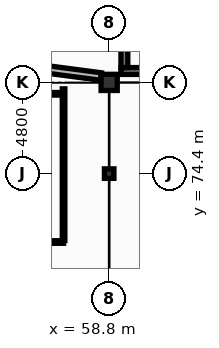
"""IFC4 building model, lengths in metres.
Left out: names, types, materials, properties, quantities, classifications, styles, units other than length and angle.
Written with IfcOpenShell. Run it as: python <this file> out.ifc"""

import sys

from ifc_helpers import new_model, si_unit, direction, frame, frame_2d, origin, origin_2d, place, context, subcontext, project, spatial, rectangle, extrude, element, save


model = new_model("IFC4")
c1 = context("Model", 3, precision=1e-05, world=origin(), true_north=direction((0.0, 1.0)))
c2 = subcontext(c1, "Body", "Model", "MODEL_VIEW")
j1 = project(units=[si_unit("LENGTHUNIT", "METRE"), si_unit("PLANEANGLEUNIT", "RADIAN")], contexts=[c1])
p1 = place(None, origin())
s1 = spatial("IfcSite", under=j1, at=p1, CompositionType="ELEMENT")
p2 = place(p1, origin())
s2 = spatial("IfcBuilding", under=s1, at=p2, CompositionType="ELEMENT")
p3 = place(p2, frame((0.0, 0.0, 5.4)))
s3 = spatial("IfcBuildingStorey", under=s2, at=p3, CompositionType="ELEMENT", Elevation=5.4)
p4 = place(p3, frame((58.8, 79.2, 0.0), z_axis=(0.0, 0.0, 1.0), x_axis=(1.0, 0.0, 0.0)))
e1 = element("IfcColumn", 1, at=p4, inside=s3, PredefinedType="COLUMN", context=c2, shape_type="SweptSolid", body=[
    extrude(rectangle(XDim=0.85, YDim=0.85, at=origin_2d()), origin(), (0.0, 0.0, 1.0), 4.5),
])
p5 = place(p3, frame((58.8, 74.4, 0.0), z_axis=(0.0, 0.0, 1.0), x_axis=(1.0, 0.0, 0.0)))
e2 = element("IfcColumn", 2, at=p5, inside=s3, PredefinedType="COLUMN", context=c2, shape_type="SweptSolid", body=[
    extrude(rectangle(XDim=0.5, YDim=0.5, at=origin_2d()), origin(), (0.0, 0.0, 1.0), 4.5),
])
p6 = place(p3, frame((55.572, 79.877, 0.0), z_axis=(0.0, 0.0, 1.0), x_axis=(0.991443994311, -0.130532778046, 0.0)))
e3 = element("IfcWall", 3, at=p6, inside=s3, PredefinedType="ELEMENTEDWALL", context=c2, shape_type="SweptSolid", body=[
    extrude(rectangle(XDim=2.824, YDim=0.395, at=frame_2d((1.412, 0.0))), origin(), (0.0, 0.0, 1.0), 3.37),
])
p7 = place(p3, frame((68.78, 79.8, 0.0), z_axis=(0.0, 0.0, 1.0), x_axis=(-1.0, 0.0, 0.0)))
e4 = element("IfcWall", 4, at=p7, inside=s3, PredefinedType="SHEAR", context=c2, shape_type="SweptSolid", body=[
    extrude(rectangle(XDim=9.36, YDim=0.36, at=frame_2d((4.68, 0.0))), origin(), (0.0, 0.0, 1.0), 4.24),
])
p8 = place(p3, frame((59.6, 79.98, 0.0), z_axis=(0.0, 0.0, 1.0), x_axis=(0.0, 1.0, 0.0)))
e5 = element("IfcWall", 5, at=p8, inside=s3, PredefinedType="SHEAR", context=c2, shape_type="SweptSolid", body=[
    extrude(rectangle(XDim=3.36, YDim=0.36, at=frame_2d((1.68, 0.0))), origin(), (0.0, 0.0, 1.0), 4.24),
])
p9 = place(p8, frame((1.08, 0.0, 0.0)))
e6 = element("IfcOpeningElement", 6, at=p9, cuts=e5, PredefinedType="OPENING", context=c2, shape_type="SweptSolid", body=[
    extrude(rectangle(XDim=1.2, YDim=2.2, at=frame_2d((0.6, 1.1))), frame((0.0, 0.19, 0.0), z_axis=(0.0, -1.0, 0.0), x_axis=(1.0, 0.0, 0.0)), (0.0, 0.0, 1.0), 0.38),
])
p10 = place(p3, frame((46.8, 78.6, 0.0), z_axis=(0.0, 0.0, 1.0), x_axis=(1.0, 0.0, 0.0)))
e7 = element("IfcWall", 7, at=p10, inside=s3, PredefinedType="PARTITIONING", context=c2, shape_type="SweptSolid", body=[
    extrude(rectangle(XDim=9.6, YDim=0.135, at=frame_2d((4.8, 0.0))), origin(), (0.0, 0.0, 1.0), 4.225),
])
p11 = place(p3, frame((56.4, 70.8, 0.0), z_axis=(0.0, 0.0, 1.0), x_axis=(-1.0, 0.0, 0.0)))
e8 = element("IfcWall", 8, at=p11, inside=s3, PredefinedType="PARTITIONING", context=c2, shape_type="SweptSolid", body=[
    extrude(rectangle(XDim=9.6, YDim=0.135, at=frame_2d((4.8, 0.0))), origin(), (0.0, 0.0, 1.0), 3.63),
])
p12 = place(p11, frame((1.94, 0.0, 0.0)))
e9 = element("IfcOpeningElement", 9, at=p12, cuts=e8, PredefinedType="OPENING", context=c2, shape_type="SweptSolid", body=[
    extrude(rectangle(XDim=0.95, YDim=2.15, at=frame_2d((0.475, 1.075))), frame((0.0, 0.077, 0.0), z_axis=(0.0, -1.0, 0.0), x_axis=(1.0, 0.0, 0.0)), (0.0, 0.0, 1.0), 0.155),
])
p13 = place(p3, frame((56.4, 78.86, 0.0), z_axis=(0.0, 0.0, 1.0), x_axis=(0.0, -1.0, 0.0)))
e10 = element("IfcWall", 10, at=p13, inside=s3, PredefinedType="PARTITIONING", context=c2, shape_type="SweptSolid", body=[
    extrude(rectangle(XDim=7.983, YDim=0.135, at=frame_2d((3.991, 0.0))), origin(), (0.0, 0.0, 1.0), 3.33),
])
save(model, sys.argv[1])
